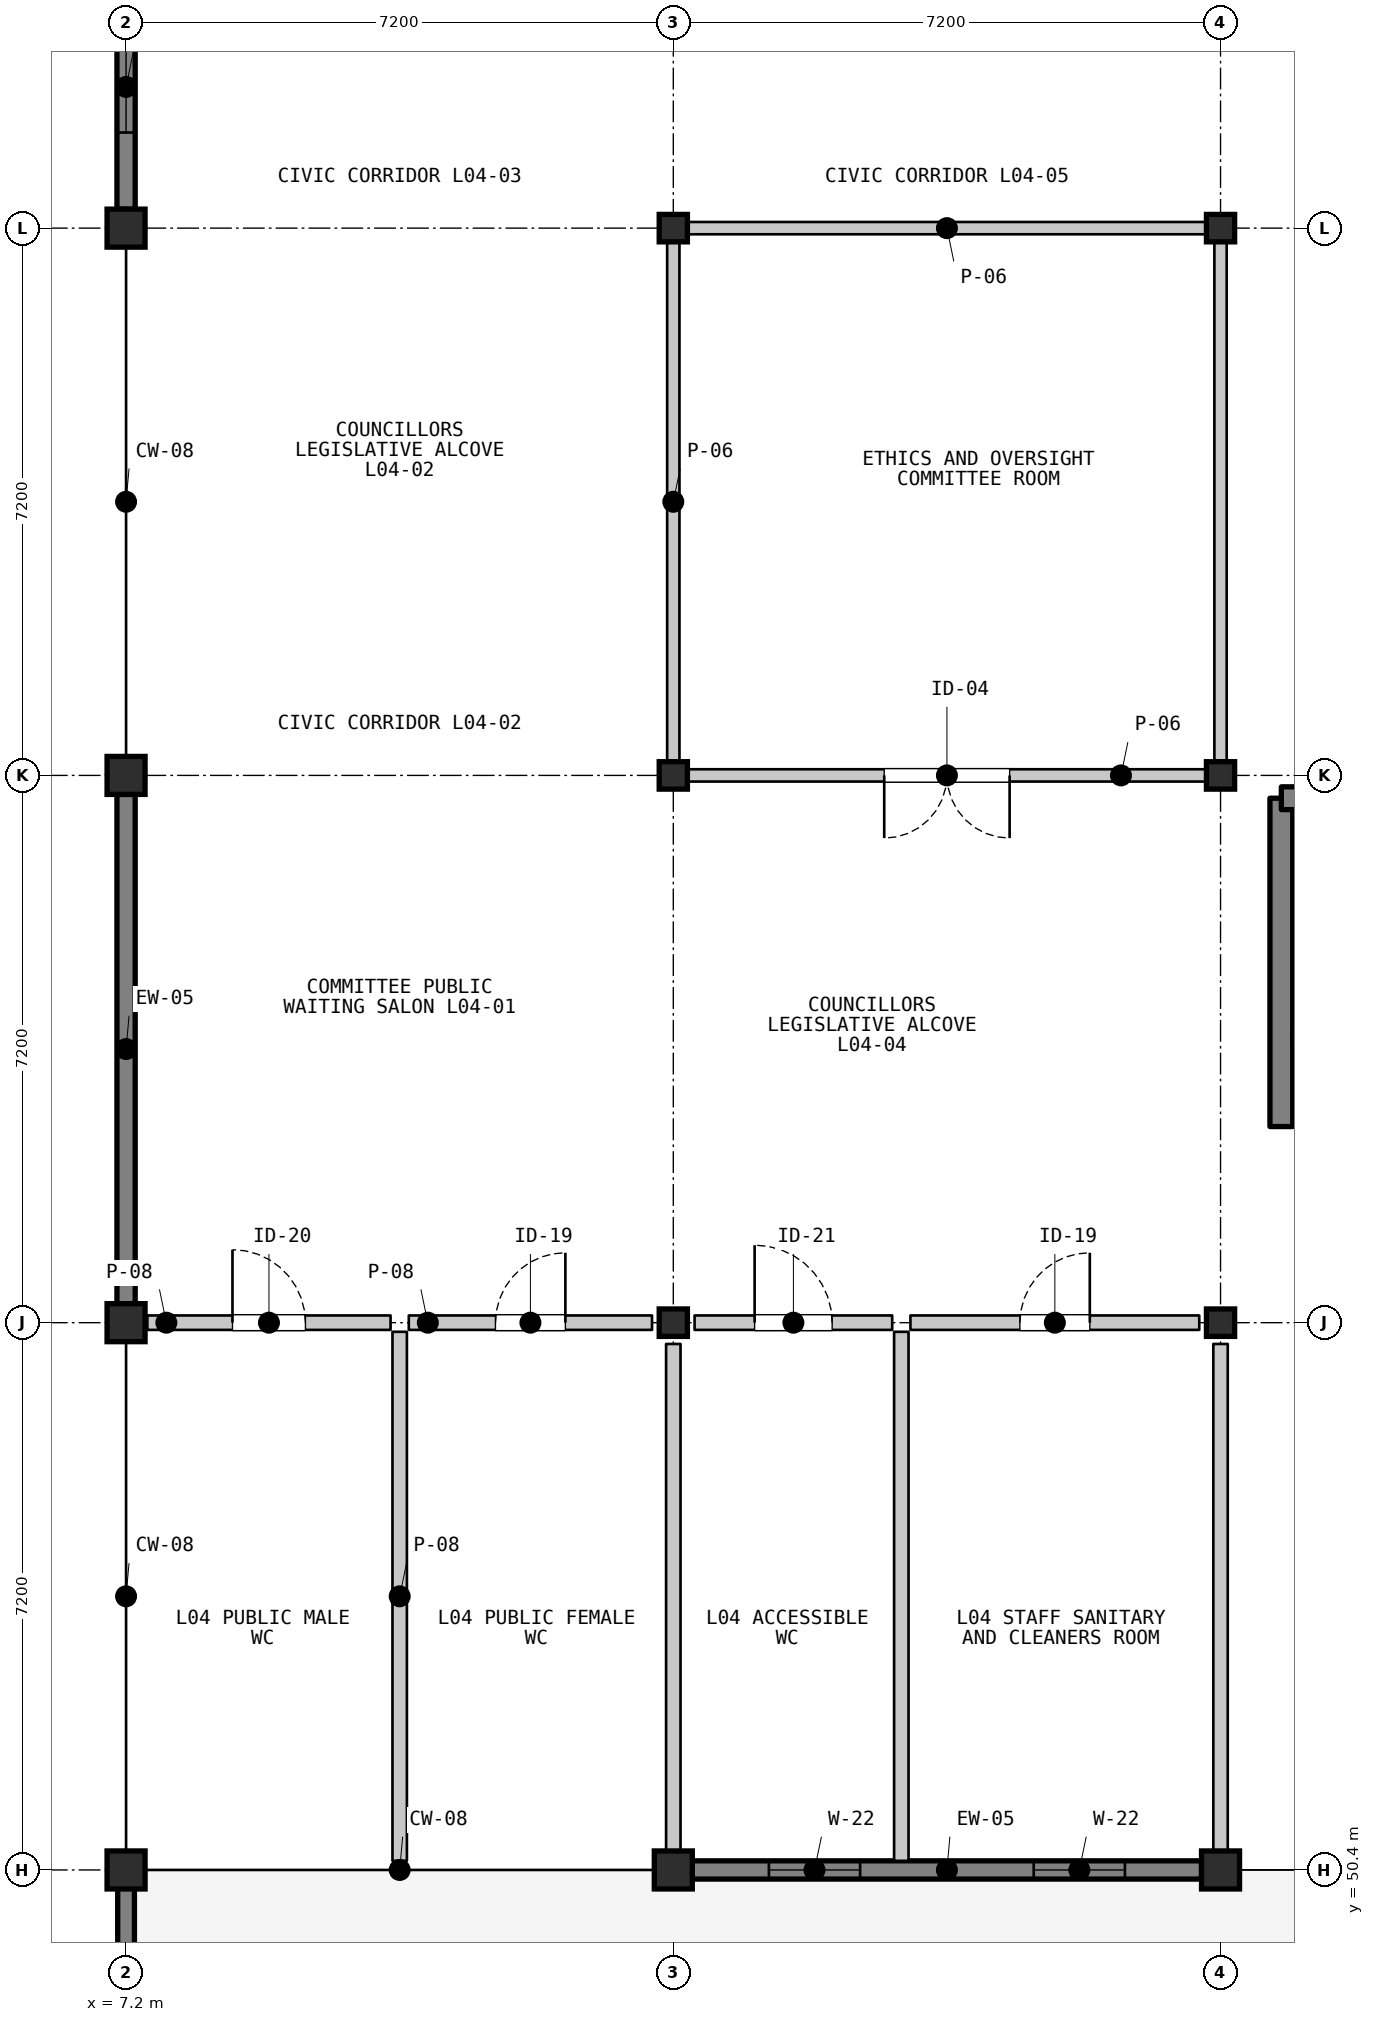
"""IFC4 building model, lengths in metres.
Left out: names, types, materials, properties, quantities, classifications, styles, units other than length and angle.
Written with IfcOpenShell. Run it as: python <this file> out.ifc"""

import sys

from ifc_helpers import new_model, si_unit, direction, frame, frame_2d, origin, origin_2d, place, context, subcontext, project, spatial, rectangle, i_section, extrude, element, fill, save


model = new_model("IFC4")
c1 = context("Model", 3, precision=1e-05, world=origin(), true_north=direction((0.0, 1.0)))
c2 = subcontext(c1, "Body", "Model", "MODEL_VIEW")
j1 = project(units=[si_unit("LENGTHUNIT", "METRE"), si_unit("PLANEANGLEUNIT", "RADIAN")], contexts=[c1])
p1 = place(None, origin())
s1 = spatial("IfcSite", under=j1, at=p1, CompositionType="ELEMENT")
p2 = place(p1, origin())
s2 = spatial("IfcBuilding", under=s1, at=p2, CompositionType="ELEMENT")
p3 = place(p2, frame((0.0, 0.0, 14.1)))
s3 = spatial("IfcBuildingStorey", under=s2, at=p3, CompositionType="ELEMENT", Elevation=14.1)
for number, where, z_axis, x_axis in (
    (1, (7.2, 50.4, 0.0), (0.0, 0.0, 1.0), (1.0, 0.0, 0.0)),
    (2, (7.2, 57.6, 0.0), (0.0, 0.0, 1.0), (1.0, 0.0, 0.0)),
    (3, (7.2, 64.8, 0.0), (0.0, 0.0, 1.0), (1.0, 0.0, 0.0)),
    (4, (7.2, 72.0, 0.0), (0.0, 0.0, 1.0), (1.0, 0.0, 0.0)),
    (5, (14.4, 50.4, 0.0), (0.0, 0.0, 1.0), (1.0, 0.0, 0.0)),
):
    element("IfcColumn", number, at=place(p3, frame(where, z_axis=z_axis, x_axis=x_axis)), inside=s3, PredefinedType="COLUMN", context=c2, shape_type="SweptSolid", body=[
        extrude(rectangle(XDim=0.5, YDim=0.5, at=origin_2d()), origin(), (0.0, 0.0, 1.0), 3.9),
    ])
for number, where, z_axis, x_axis in (
    (6, (14.4, 57.6, 0.0), (0.0, 0.0, 1.0), (1.0, 0.0, 0.0)),
    (7, (14.4, 64.8, 0.0), (0.0, 0.0, 1.0), (1.0, 0.0, 0.0)),
    (8, (14.4, 72.0, 0.0), (0.0, 0.0, 1.0), (1.0, 0.0, 0.0)),
):
    element("IfcColumn", number, at=place(p3, frame(where, z_axis=z_axis, x_axis=x_axis)), inside=s3, PredefinedType="COLUMN", context=c2, shape_type="SweptSolid", body=[
        extrude(i_section(OverallWidth=0.371, OverallDepth=0.361, WebThickness=0.012, FlangeThickness=0.02, FilletRadius=0.015, at=origin_2d()), origin(), (0.0, 0.0, 1.0), 3.9),
    ])
p4 = place(p3, frame((21.6, 50.4, 0.0), z_axis=(0.0, 0.0, 1.0), x_axis=(1.0, 0.0, 0.0)))
e9 = element("IfcColumn", 9, at=p4, inside=s3, PredefinedType="COLUMN", context=c2, shape_type="SweptSolid", body=[
    extrude(rectangle(XDim=0.5, YDim=0.5, at=origin_2d()), origin(), (0.0, 0.0, 1.0), 3.9),
])
for number, where, z_axis, x_axis in (
    (10, (21.6, 57.6, 0.0), (0.0, 0.0, 1.0), (1.0, 0.0, 0.0)),
    (11, (21.6, 64.8, 0.0), (0.0, 0.0, 1.0), (1.0, 0.0, 0.0)),
    (12, (21.6, 72.0, 0.0), (0.0, 0.0, 1.0), (1.0, 0.0, 0.0)),
):
    element("IfcColumn", number, at=place(p3, frame(where, z_axis=z_axis, x_axis=x_axis)), inside=s3, PredefinedType="COLUMN", context=c2, shape_type="SweptSolid", body=[
        extrude(i_section(OverallWidth=0.371, OverallDepth=0.361, WebThickness=0.012, FlangeThickness=0.02, FilletRadius=0.015, at=origin_2d()), origin(), (0.0, 0.0, 1.0), 3.9),
    ])
p5 = place(p3, frame((7.2, 57.85, 0.0), z_axis=(0.0, 0.0, 1.0), x_axis=(0.0, 1.0, 0.0)))
e13 = element("IfcWall", 13, at=p5, inside=s3, PredefinedType="SOLIDWALL", context=c2, shape_type="SweptSolid", body=[
    extrude(rectangle(XDim=6.7, YDim=0.24, at=frame_2d((3.35, 0.0))), origin(), (0.0, 0.0, 1.0), 3.172),
])
p6 = place(p3, frame((7.2, 72.25, 0.0), z_axis=(0.0, 0.0, 1.0), x_axis=(0.0, 1.0, 0.0)))
e14 = element("IfcWall", 14, at=p6, inside=s3, PredefinedType="SOLIDWALL", context=c2, shape_type="SweptSolid", body=[
    extrude(rectangle(XDim=6.7, YDim=0.24, at=frame_2d((3.35, 0.0))), origin(), (0.0, 0.0, 1.0), 3.172),
])
p7 = place(p6, frame((1.008, 0.0, 0.95)))
e15 = element("IfcOpeningElement", 15, at=p7, cuts=e14, PredefinedType="OPENING", context=c2, shape_type="SweptSolid", body=[
    extrude(rectangle(XDim=1.2, YDim=1.7, at=frame_2d((0.6, 0.85))), frame((0.0, 0.13, 0.0), z_axis=(0.0, -1.0, 0.0), x_axis=(1.0, 0.0, 0.0)), (0.0, 0.0, 1.0), 0.26),
])
p8 = place(p6, frame((4.492, 0.0, 0.95)))
e16 = element("IfcOpeningElement", 16, at=p8, cuts=e14, PredefinedType="OPENING", context=c2, shape_type="SweptSolid", body=[
    extrude(rectangle(XDim=1.2, YDim=1.7, at=frame_2d((0.6, 0.85))), frame((0.0, 0.13, 0.0), z_axis=(0.0, -1.0, 0.0), x_axis=(1.0, 0.0, 0.0)), (0.0, 0.0, 1.0), 0.26),
])
p9 = place(p3, frame((21.35, 50.4, 0.0), z_axis=(0.0, 0.0, 1.0), x_axis=(-1.0, 0.0, 0.0)))
e17 = element("IfcWall", 17, at=p9, inside=s3, PredefinedType="SOLIDWALL", context=c2, shape_type="SweptSolid", body=[
    extrude(rectangle(XDim=6.7, YDim=0.24, at=frame_2d((3.35, 0.0))), origin(), (0.0, 0.0, 1.0), 3.118),
])
p10 = place(p9, frame((1.008, 0.0, 0.95)))
e18 = element("IfcOpeningElement", 18, at=p10, cuts=e17, PredefinedType="OPENING", context=c2, shape_type="SweptSolid", body=[
    extrude(rectangle(XDim=1.2, YDim=1.7, at=frame_2d((0.6, 0.85))), frame((0.0, 0.13, 0.0), z_axis=(0.0, -1.0, 0.0), x_axis=(1.0, 0.0, 0.0)), (0.0, 0.0, 1.0), 0.26),
])
p11 = place(p9, frame((4.492, 0.0, 0.95)))
e19 = element("IfcOpeningElement", 19, at=p11, cuts=e17, PredefinedType="OPENING", context=c2, shape_type="SweptSolid", body=[
    extrude(rectangle(XDim=1.2, YDim=1.7, at=frame_2d((0.6, 0.85))), frame((0.0, 0.13, 0.0), z_axis=(0.0, -1.0, 0.0), x_axis=(1.0, 0.0, 0.0)), (0.0, 0.0, 1.0), 0.26),
])
p12 = place(p3, frame((7.2, 43.35, 0.0), z_axis=(0.0, 0.0, 1.0), x_axis=(0.0, 1.0, 0.0)))
e20 = element("IfcWall", 20, at=p12, inside=s3, PredefinedType="PARAPET", context=c2, shape_type="SweptSolid", body=[
    extrude(rectangle(XDim=6.9, YDim=0.22, at=frame_2d((3.45, 0.0))), origin(), (0.0, 0.0, 1.0), 0.85),
])
p13 = place(p3, frame((22.4, 60.18, 0.0), z_axis=(0.0, 0.0, 1.0), x_axis=(0.0, 1.0, 0.0)))
e21 = element("IfcWall", 21, at=p13, inside=s3, PredefinedType="SHEAR", context=c2, shape_type="SweptSolid", body=[
    extrude(rectangle(XDim=4.32, YDim=0.3, at=frame_2d((2.16, 0.0))), origin(), (0.0, 0.0, 1.0), 3.72),
])
p14 = place(p3, frame((22.4, 64.5, 0.0), z_axis=(0.0, 0.0, 1.0), x_axis=(1.0, 0.0, 0.0)))
e22 = element("IfcWall", 22, at=p14, inside=s3, PredefinedType="SHEAR", context=c2, shape_type="SweptSolid", body=[
    extrude(rectangle(XDim=5.92, YDim=0.3, at=frame_2d((2.96, 0.0))), origin(), (0.0, 0.0, 1.0), 3.72),
])
p15 = place(p3, frame((22.55, 61.35, 0.0), z_axis=(0.0, 0.0, 1.0), x_axis=(1.0, 0.0, 0.0)))
e23 = element("IfcWall", 23, at=p15, inside=s3, PredefinedType="SHEAR", context=c2, shape_type="SweptSolid", body=[
    extrude(rectangle(XDim=2.4, YDim=0.22, at=frame_2d((1.2, 0.0))), origin(), (0.0, 0.0, 1.0), 3.72),
])
p16 = place(p3, frame((7.48, 57.6, 0.0), z_axis=(0.0, 0.0, 1.0), x_axis=(1.0, 0.0, 0.0)))
e24 = element("IfcWall", 24, at=p16, inside=s3, PredefinedType="PARTITIONING", context=c2, shape_type="SweptSolid", body=[
    extrude(rectangle(XDim=3.2, YDim=0.19, at=frame_2d((1.6, 0.0))), origin(), (0.0, 0.0, 1.0), 3.088),
])
p17 = place(p16, frame((1.12, 0.0, 0.0)))
e25 = element("IfcOpeningElement", 25, at=p17, cuts=e24, PredefinedType="OPENING", context=c2, shape_type="SweptSolid", body=[
    extrude(rectangle(XDim=0.96, YDim=2.1, at=frame_2d((0.48, 1.05))), frame((0.0, 0.105, 0.0), z_axis=(0.0, -1.0, 0.0), x_axis=(1.0, 0.0, 0.0)), (0.0, 0.0, 1.0), 0.21),
])
p18 = place(p3, frame((10.8, 57.48, 0.0), z_axis=(0.0, 0.0, 1.0), x_axis=(0.0, -1.0, 0.0)))
e26 = element("IfcWall", 26, at=p18, inside=s3, PredefinedType="PARTITIONING", context=c2, shape_type="SweptSolid", body=[
    extrude(rectangle(XDim=6.96, YDim=0.19, at=frame_2d((3.48, 0.0))), origin(), (0.0, 0.0, 1.0), 3.088),
])
p19 = place(p3, frame((10.92, 57.6, 0.0), z_axis=(0.0, 0.0, 1.0), x_axis=(1.0, 0.0, 0.0)))
e27 = element("IfcWall", 27, at=p19, inside=s3, PredefinedType="PARTITIONING", context=c2, shape_type="SweptSolid", body=[
    extrude(rectangle(XDim=3.2, YDim=0.19, at=frame_2d((1.6, 0.0))), origin(), (0.0, 0.0, 1.0), 3.088),
])
p20 = place(p19, frame((1.14, 0.0, 0.0)))
e28 = element("IfcOpeningElement", 28, at=p20, cuts=e27, PredefinedType="OPENING", context=c2, shape_type="SweptSolid", body=[
    extrude(rectangle(XDim=0.92, YDim=2.1, at=frame_2d((0.46, 1.05))), frame((0.0, 0.105, 0.0), z_axis=(0.0, -1.0, 0.0), x_axis=(1.0, 0.0, 0.0)), (0.0, 0.0, 1.0), 0.21),
])
p21 = place(p3, frame((14.4, 57.32, 0.0), z_axis=(0.0, 0.0, 1.0), x_axis=(0.0, -1.0, 0.0)))
e29 = element("IfcWall", 29, at=p21, inside=s3, PredefinedType="PARTITIONING", context=c2, shape_type="SweptSolid", body=[
    extrude(rectangle(XDim=6.8, YDim=0.19, at=frame_2d((3.4, 0.0))), origin(), (0.0, 0.0, 1.0), 3.088),
])
p22 = place(p3, frame((14.68, 57.6, 0.0), z_axis=(0.0, 0.0, 1.0), x_axis=(1.0, 0.0, 0.0)))
e30 = element("IfcWall", 30, at=p22, inside=s3, PredefinedType="PARTITIONING", context=c2, shape_type="SweptSolid", body=[
    extrude(rectangle(XDim=2.6, YDim=0.19, at=frame_2d((1.3, 0.0))), origin(), (0.0, 0.0, 1.0), 3.108),
])
p23 = place(p22, frame((0.79, 0.0, 0.0)))
e31 = element("IfcOpeningElement", 31, at=p23, cuts=e30, PredefinedType="OPENING", context=c2, shape_type="SweptSolid", body=[
    extrude(rectangle(XDim=1.02, YDim=2.15, at=frame_2d((0.51, 1.075))), frame((0.0, 0.105, 0.0), z_axis=(0.0, -1.0, 0.0), x_axis=(1.0, 0.0, 0.0)), (0.0, 0.0, 1.0), 0.21),
])
p24 = place(p3, frame((17.4, 57.48, 0.0), z_axis=(0.0, 0.0, 1.0), x_axis=(0.0, -1.0, 0.0)))
e32 = element("IfcWall", 32, at=p24, inside=s3, PredefinedType="PARTITIONING", context=c2, shape_type="SweptSolid", body=[
    extrude(rectangle(XDim=6.96, YDim=0.19, at=frame_2d((3.48, 0.0))), origin(), (0.0, 0.0, 1.0), 3.108),
])
p25 = place(p3, frame((17.52, 57.6, 0.0), z_axis=(0.0, 0.0, 1.0), x_axis=(1.0, 0.0, 0.0)))
e33 = element("IfcWall", 33, at=p25, inside=s3, PredefinedType="PARTITIONING", context=c2, shape_type="SweptSolid", body=[
    extrude(rectangle(XDim=3.8, YDim=0.19, at=frame_2d((1.9, 0.0))), origin(), (0.0, 0.0, 1.0), 3.108),
])
p26 = place(p25, frame((1.44, 0.0, 0.0)))
e34 = element("IfcOpeningElement", 34, at=p26, cuts=e33, PredefinedType="OPENING", context=c2, shape_type="SweptSolid", body=[
    extrude(rectangle(XDim=0.92, YDim=2.1, at=frame_2d((0.46, 1.05))), frame((0.0, 0.105, 0.0), z_axis=(0.0, -1.0, 0.0), x_axis=(1.0, 0.0, 0.0)), (0.0, 0.0, 1.0), 0.21),
])
p27 = place(p3, frame((21.6, 57.32, 0.0), z_axis=(0.0, 0.0, 1.0), x_axis=(0.0, -1.0, 0.0)))
e35 = element("IfcWall", 35, at=p27, inside=s3, PredefinedType="PARTITIONING", context=c2, shape_type="SweptSolid", body=[
    extrude(rectangle(XDim=6.8, YDim=0.19, at=frame_2d((3.4, 0.0))), origin(), (0.0, 0.0, 1.0), 3.108),
])
p28 = place(p3, frame((21.48, 64.8, 0.0), z_axis=(0.0, 0.0, 1.0), x_axis=(-1.0, 0.0, 0.0)))
e36 = element("IfcWall", 36, at=p28, inside=s3, PredefinedType="PARTITIONING", context=c2, shape_type="SweptSolid", body=[
    extrude(rectangle(XDim=6.96, YDim=0.162, at=frame_2d((3.48, 0.0))), origin(), (0.0, 0.0, 1.0), 3.108),
])
p29 = place(p28, frame((2.655, 0.0, 0.0)))
e37 = element("IfcOpeningElement", 37, at=p29, cuts=e36, PredefinedType="OPENING", context=c2, shape_type="SweptSolid", body=[
    extrude(rectangle(XDim=1.65, YDim=2.35, at=frame_2d((0.825, 1.175))), frame((0.0, 0.091, 0.0), z_axis=(0.0, -1.0, 0.0), x_axis=(1.0, 0.0, 0.0)), (0.0, 0.0, 1.0), 0.182),
])
p30 = place(p3, frame((14.52, 72.0, 0.0), z_axis=(0.0, 0.0, 1.0), x_axis=(1.0, 0.0, 0.0)))
e38 = element("IfcWall", 38, at=p30, inside=s3, PredefinedType="PARTITIONING", context=c2, shape_type="SweptSolid", body=[
    extrude(rectangle(XDim=6.96, YDim=0.162, at=frame_2d((3.48, 0.0))), origin(), (0.0, 0.0, 1.0), 3.108),
])
p31 = place(p3, frame((14.4, 64.92, 0.0), z_axis=(0.0, 0.0, 1.0), x_axis=(0.0, 1.0, 0.0)))
e39 = element("IfcWall", 39, at=p31, inside=s3, PredefinedType="PARTITIONING", context=c2, shape_type="SweptSolid", body=[
    extrude(rectangle(XDim=6.96, YDim=0.162, at=frame_2d((3.48, 0.0))), origin(), (0.0, 0.0, 1.0), 3.088),
])
p32 = place(p3, frame((21.6, 71.88, 0.0), z_axis=(0.0, 0.0, 1.0), x_axis=(0.0, -1.0, 0.0)))
e40 = element("IfcWall", 40, at=p32, inside=s3, PredefinedType="PARTITIONING", context=c2, shape_type="SweptSolid", body=[
    extrude(rectangle(XDim=6.96, YDim=0.162, at=frame_2d((3.48, 0.0))), origin(), (0.0, 0.0, 1.0), 3.108),
])
p33 = place(p7, origin())
e41 = element("IfcWindow", 41, at=p33, inside=s3, PartitioningType="SINGLE_PANEL", PredefinedType="WINDOW", context=c2, shape_type="SweptSolid", body=[
    extrude(rectangle(XDim=1.2, YDim=1.7, at=frame_2d((0.6, 0.85))), frame((0.0, 0.03, 0.0), z_axis=(0.0, -1.0, 0.0), x_axis=(1.0, 0.0, 0.0)), (0.0, 0.0, 1.0), 0.06),
])
fill(e15, e41)
p34 = place(p10, origin())
e42 = element("IfcWindow", 42, at=p34, inside=s3, PartitioningType="SINGLE_PANEL", PredefinedType="WINDOW", context=c2, shape_type="SweptSolid", body=[
    extrude(rectangle(XDim=1.2, YDim=1.7, at=frame_2d((0.6, 0.85))), frame((0.0, 0.03, 0.0), z_axis=(0.0, -1.0, 0.0), x_axis=(1.0, 0.0, 0.0)), (0.0, 0.0, 1.0), 0.06),
])
fill(e18, e42)
p35 = place(p11, origin())
e43 = element("IfcWindow", 43, at=p35, inside=s3, PartitioningType="SINGLE_PANEL", PredefinedType="WINDOW", context=c2, shape_type="SweptSolid", body=[
    extrude(rectangle(XDim=1.2, YDim=1.7, at=frame_2d((0.6, 0.85))), frame((0.0, 0.03, 0.0), z_axis=(0.0, -1.0, 0.0), x_axis=(1.0, 0.0, 0.0)), (0.0, 0.0, 1.0), 0.06),
])
fill(e19, e43)
p36 = place(p17, origin())
e44 = element("IfcDoor", 44, at=p36, inside=s3, OperationType="SINGLE_SWING_LEFT", PredefinedType="DOOR", context=c2, shape_type="SweptSolid", body=[
    extrude(rectangle(XDim=0.96, YDim=2.1, at=frame_2d((0.48, 1.05))), frame((0.0, 0.025, 0.0), z_axis=(0.0, -1.0, 0.0), x_axis=(1.0, 0.0, 0.0)), (0.0, 0.0, 1.0), 0.05),
])
fill(e25, e44)
p37 = place(p20, origin())
e45 = element("IfcDoor", 45, at=p37, inside=s3, OperationType="SINGLE_SWING_RIGHT", PredefinedType="DOOR", context=c2, shape_type="SweptSolid", body=[
    extrude(rectangle(XDim=0.92, YDim=2.1, at=frame_2d((0.46, 1.05))), frame((0.0, 0.025, 0.0), z_axis=(0.0, -1.0, 0.0), x_axis=(1.0, 0.0, 0.0)), (0.0, 0.0, 1.0), 0.05),
])
fill(e28, e45)
p38 = place(p23, origin())
e46 = element("IfcDoor", 46, at=p38, inside=s3, OperationType="SINGLE_SWING_LEFT", PredefinedType="DOOR", context=c2, shape_type="SweptSolid", body=[
    extrude(rectangle(XDim=1.02, YDim=2.15, at=frame_2d((0.51, 1.075))), frame((0.0, 0.025, 0.0), z_axis=(0.0, -1.0, 0.0), x_axis=(1.0, 0.0, 0.0)), (0.0, 0.0, 1.0), 0.05),
])
fill(e31, e46)
p39 = place(p26, origin())
e47 = element("IfcDoor", 47, at=p39, inside=s3, OperationType="SINGLE_SWING_RIGHT", PredefinedType="DOOR", context=c2, shape_type="SweptSolid", body=[
    extrude(rectangle(XDim=0.92, YDim=2.1, at=frame_2d((0.46, 1.05))), frame((0.0, 0.025, 0.0), z_axis=(0.0, -1.0, 0.0), x_axis=(1.0, 0.0, 0.0)), (0.0, 0.0, 1.0), 0.05),
])
fill(e34, e47)
p40 = place(p29, origin())
e48 = element("IfcDoor", 48, at=p40, inside=s3, OperationType="DOUBLE_DOOR_SINGLE_SWING", PredefinedType="DOOR", context=c2, shape_type="SweptSolid", body=[
    extrude(rectangle(XDim=1.65, YDim=2.35, at=frame_2d((0.825, 1.175))), frame((0.0, 0.025, 0.0), z_axis=(0.0, -1.0, 0.0), x_axis=(1.0, 0.0, 0.0)), (0.0, 0.0, 1.0), 0.05),
])
fill(e37, e48)
save(model, sys.argv[1])
